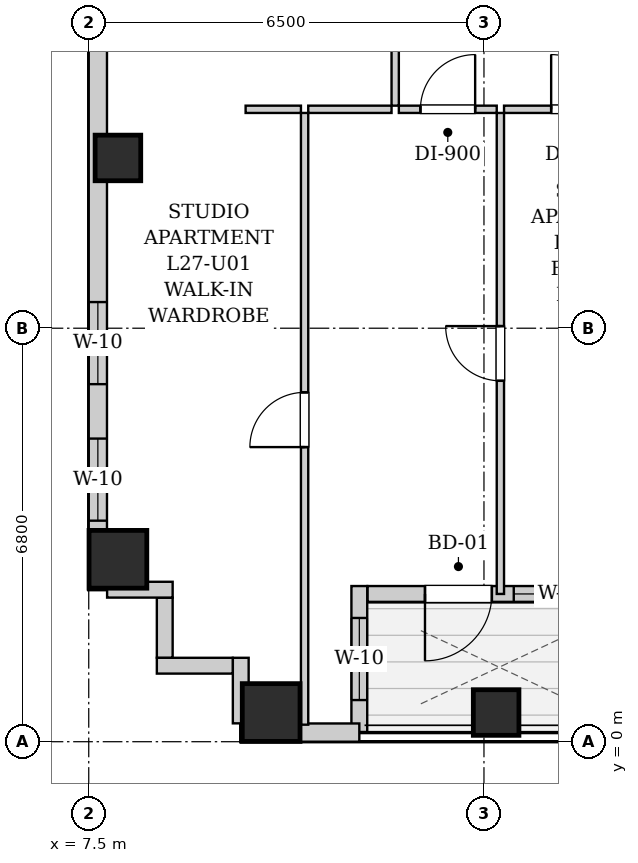
"""IFC4 building model, lengths in metres.
Left out: names, types, materials, properties, quantities, classifications, styles, units other than length and angle.
Written with IfcOpenShell. Run it as: python <this file> out.ifc"""

import sys

from ifc_helpers import new_model, si_unit, direction, frame, frame_2d, origin, origin_2d, place, context, subcontext, project, spatial, rectangle, extrude, element, fill, save


model = new_model("IFC4")
c1 = context("Model", 3, precision=1e-05, world=origin(), true_north=direction((0.0, 1.0)))
c2 = subcontext(c1, "Body", "Model", "MODEL_VIEW")
j1 = project(units=[si_unit("LENGTHUNIT", "METRE"), si_unit("PLANEANGLEUNIT", "RADIAN")], contexts=[c1])
p1 = place(None, origin())
s1 = spatial("IfcSite", under=j1, at=p1, CompositionType="ELEMENT")
p2 = place(p1, origin())
s2 = spatial("IfcBuilding", under=s1, at=p2, CompositionType="ELEMENT")
p3 = place(p2, frame((0.0, 0.0, 97.5)))
s3 = spatial("IfcBuildingStorey", under=s2, at=p3, CompositionType="ELEMENT", Elevation=97.5)
p4 = place(p3, frame((10.5, 0.48, 0.0), z_axis=(0.0, 0.0, 1.0), x_axis=(1.0, 0.0, 0.0)))
e1 = element("IfcColumn", 1, at=p4, inside=s3, PredefinedType="COLUMN", context=c2, shape_type="SweptSolid", body=[
    extrude(rectangle(XDim=0.95, YDim=0.95, at=origin_2d()), origin(), (0.0, 0.0, 1.0), 3.2),
])
p5 = place(p3, frame((14.2, 0.48, 0.0), z_axis=(0.0, 0.0, 1.0), x_axis=(1.0, 0.0, 0.0)))
e2 = element("IfcColumn", 2, at=p5, inside=s3, PredefinedType="COLUMN", context=c2, shape_type="SweptSolid", body=[
    extrude(rectangle(XDim=0.75, YDim=0.75, at=origin_2d()), origin(), (0.0, 0.0, 1.0), 3.2),
])
p6 = place(p3, frame((7.98, 3.0, 0.0), z_axis=(0.0, 0.0, 1.0), x_axis=(1.0, 0.0, 0.0)))
e3 = element("IfcColumn", 3, at=p6, inside=s3, PredefinedType="COLUMN", context=c2, shape_type="SweptSolid", body=[
    extrude(rectangle(XDim=0.95, YDim=0.95, at=origin_2d()), origin(), (0.0, 0.0, 1.0), 3.2),
])
p7 = place(p3, frame((7.98, 9.6, 0.0), z_axis=(0.0, 0.0, 1.0), x_axis=(1.0, 0.0, 0.0)))
e4 = element("IfcColumn", 4, at=p7, inside=s3, PredefinedType="COLUMN", context=c2, shape_type="SweptSolid", body=[
    extrude(rectangle(XDim=0.75, YDim=0.75, at=origin_2d()), origin(), (0.0, 0.0, 1.0), 3.2),
])
p8 = place(p3, frame((16.416, 2.43, 0.0), z_axis=(0.0, 0.0, 1.0), x_axis=(-1.0, 0.0, 0.0)))
e5 = element("IfcWall", 5, at=p8, inside=s3, PredefinedType="SOLIDWALL", context=c2, shape_type="SweptSolid", body=[
    extrude(rectangle(XDim=4.332, YDim=0.26, at=frame_2d((2.166, 0.0))), origin(), (0.0, 0.0, 1.0), 2.94),
])
p9 = place(p8, frame((2.286, 0.0, 0.0)))
e6 = element("IfcOpeningElement", 6, at=p9, cuts=e5, PredefinedType="OPENING", context=c2, shape_type="SweptSolid", body=[
    extrude(rectangle(XDim=1.1, YDim=2.0, at=frame_2d((0.55, 1.0))), frame((0.0, 0.14, 0.0), z_axis=(0.0, -1.0, 0.0), x_axis=(1.0, 0.0, 0.0)), (0.0, 0.0, 1.0), 0.28),
])
p10 = place(p8, frame((0.326, 0.0, 0.85)))
e7 = element("IfcOpeningElement", 7, at=p10, cuts=e5, PredefinedType="OPENING", context=c2, shape_type="SweptSolid", body=[
    extrude(rectangle(XDim=1.6, YDim=1.65, at=frame_2d((0.8, 0.825))), frame((0.0, 0.14, 0.0), z_axis=(0.0, -1.0, 0.0), x_axis=(1.0, 0.0, 0.0)), (0.0, 0.0, 1.0), 0.28),
])
p11 = place(p3, frame((11.95, 2.56, 0.0), z_axis=(0.0, 0.0, 1.0), x_axis=(0.0, -1.0, 0.0)))
e8 = element("IfcWall", 8, at=p11, inside=s3, PredefinedType="SOLIDWALL", context=c2, shape_type="SweptSolid", body=[
    extrude(rectangle(XDim=2.4, YDim=0.26, at=frame_2d((1.2, 0.0))), origin(), (0.0, 0.0, 1.0), 2.94),
])
p12 = place(p11, frame((0.525, 0.0, 0.55)))
e9 = element("IfcOpeningElement", 9, at=p12, cuts=e8, PredefinedType="OPENING", context=c2, shape_type="SweptSolid", body=[
    extrude(rectangle(XDim=1.35, YDim=1.2, at=frame_2d((0.675, 0.6))), frame((0.0, 0.14, 0.0), z_axis=(0.0, -1.0, 0.0), x_axis=(1.0, 0.0, 0.0)), (0.0, 0.0, 1.0), 0.28),
])
p13 = place(p3, frame((11.95, 0.15, 0.0), z_axis=(0.0, 0.0, 1.0), x_axis=(-1.0, 0.0, 0.0)))
e10 = element("IfcWall", 10, at=p13, inside=s3, PredefinedType="SOLIDWALL", context=c2, shape_type="SweptSolid", body=[
    extrude(rectangle(XDim=1.95, YDim=0.3, at=frame_2d((0.975, 0.0))), origin(), (0.0, 0.0, 1.0), 2.94),
])
p14 = place(p3, frame((7.65, 2.5, 0.0), z_axis=(0.0, 0.0, 1.0), x_axis=(0.0, 1.0, 0.0)))
e11 = element("IfcWall", 11, at=p14, inside=s3, PredefinedType="SOLIDWALL", context=c2, shape_type="SweptSolid", body=[
    extrude(rectangle(XDim=38.3, YDim=0.3, at=frame_2d((19.15, 0.0))), origin(), (0.0, 0.0, 1.0), 2.94),
])
p15 = place(p14, frame((3.38, 0.0, 0.55)))
e12 = element("IfcOpeningElement", 12, at=p15, cuts=e11, PredefinedType="OPENING", context=c2, shape_type="SweptSolid", body=[
    extrude(rectangle(XDim=1.35, YDim=1.2, at=frame_2d((0.675, 0.6))), frame((0.0, 0.16, 0.0), z_axis=(0.0, -1.0, 0.0), x_axis=(1.0, 0.0, 0.0)), (0.0, 0.0, 1.0), 0.32),
])
p16 = place(p14, frame((1.135, 0.0, 0.55)))
e13 = element("IfcOpeningElement", 13, at=p16, cuts=e11, PredefinedType="OPENING", context=c2, shape_type="SweptSolid", body=[
    extrude(rectangle(XDim=1.35, YDim=1.2, at=frame_2d((0.675, 0.6))), frame((0.0, 0.16, 0.0), z_axis=(0.0, -1.0, 0.0), x_axis=(1.0, 0.0, 0.0)), (0.0, 0.0, 1.0), 0.32),
])
p17 = place(p14, frame((33.946, 0.0, 0.55)))
e14 = element("IfcOpeningElement", 14, at=p17, cuts=e11, PredefinedType="OPENING", context=c2, shape_type="SweptSolid", body=[
    extrude(rectangle(XDim=1.35, YDim=1.2, at=frame_2d((0.675, 0.6))), frame((0.0, 0.16, 0.0), z_axis=(0.0, -1.0, 0.0), x_axis=(1.0, 0.0, 0.0)), (0.0, 0.0, 1.0), 0.32),
])
p18 = place(p14, frame((32.035, 0.0, 0.55)))
e15 = element("IfcOpeningElement", 15, at=p18, cuts=e11, PredefinedType="OPENING", context=c2, shape_type="SweptSolid", body=[
    extrude(rectangle(XDim=1.35, YDim=1.2, at=frame_2d((0.675, 0.6))), frame((0.0, 0.16, 0.0), z_axis=(0.0, -1.0, 0.0), x_axis=(1.0, 0.0, 0.0)), (0.0, 0.0, 1.0), 0.32),
])
p19 = place(p14, frame((15.65, 0.0, 0.55)))
e16 = element("IfcOpeningElement", 16, at=p19, cuts=e11, PredefinedType="OPENING", context=c2, shape_type="SweptSolid", body=[
    extrude(rectangle(XDim=1.35, YDim=1.2, at=frame_2d((0.675, 0.6))), frame((0.0, 0.16, 0.0), z_axis=(0.0, -1.0, 0.0), x_axis=(1.0, 0.0, 0.0)), (0.0, 0.0, 1.0), 0.32),
])
p20 = place(p14, frame((13.035, 0.0, 0.55)))
e17 = element("IfcOpeningElement", 17, at=p20, cuts=e11, PredefinedType="OPENING", context=c2, shape_type="SweptSolid", body=[
    extrude(rectangle(XDim=1.35, YDim=1.2, at=frame_2d((0.675, 0.6))), frame((0.0, 0.16, 0.0), z_axis=(0.0, -1.0, 0.0), x_axis=(1.0, 0.0, 0.0)), (0.0, 0.0, 1.0), 0.32),
])
p21 = place(p14, frame((22.831, 0.0, 0.55)))
e18 = element("IfcOpeningElement", 18, at=p21, cuts=e11, PredefinedType="OPENING", context=c2, shape_type="SweptSolid", body=[
    extrude(rectangle(XDim=1.35, YDim=1.2, at=frame_2d((0.675, 0.6))), frame((0.0, 0.16, 0.0), z_axis=(0.0, -1.0, 0.0), x_axis=(1.0, 0.0, 0.0)), (0.0, 0.0, 1.0), 0.32),
])
p22 = place(p14, frame((24.441, 0.0, 0.55)))
e19 = element("IfcOpeningElement", 19, at=p22, cuts=e11, PredefinedType="OPENING", context=c2, shape_type="SweptSolid", body=[
    extrude(rectangle(XDim=1.35, YDim=1.2, at=frame_2d((0.675, 0.6))), frame((0.0, 0.16, 0.0), z_axis=(0.0, -1.0, 0.0), x_axis=(1.0, 0.0, 0.0)), (0.0, 0.0, 1.0), 0.32),
])
p23 = place(p3, frame((10.0, 0.302, 0.0), z_axis=(0.0, 0.0, 1.0), x_axis=(0.0, 1.0, 0.0)))
e20 = element("IfcWall", 20, at=p23, inside=s3, PredefinedType="SOLIDWALL", context=c2, shape_type="SweptSolid", body=[
    extrude(rectangle(XDim=1.078, YDim=0.26, at=frame_2d((0.539, 0.0))), origin(), (0.0, 0.0, 1.0), 2.94),
])
p24 = place(p3, frame((9.868, 1.25, 0.0), z_axis=(0.0, 0.0, 1.0), x_axis=(-1.0, 0.0, 0.0)))
e21 = element("IfcWall", 21, at=p24, inside=s3, PredefinedType="SOLIDWALL", context=c2, shape_type="SweptSolid", body=[
    extrude(rectangle(XDim=1.248, YDim=0.26, at=frame_2d((0.624, 0.0))), origin(), (0.0, 0.0, 1.0), 2.94),
])
p25 = place(p3, frame((8.75, 1.382, 0.0), z_axis=(0.0, 0.0, 1.0), x_axis=(0.0, 1.0, 0.0)))
e22 = element("IfcWall", 22, at=p25, inside=s3, PredefinedType="SOLIDWALL", context=c2, shape_type="SweptSolid", body=[
    extrude(rectangle(XDim=0.986, YDim=0.26, at=frame_2d((0.493, 0.0))), origin(), (0.0, 0.0, 1.0), 2.94),
])
p26 = place(p3, frame((8.88, 2.5, 0.0), z_axis=(0.0, 0.0, 1.0), x_axis=(-1.0, 0.0, 0.0)))
e23 = element("IfcWall", 23, at=p26, inside=s3, PredefinedType="SOLIDWALL", context=c2, shape_type="SweptSolid", body=[
    extrude(rectangle(XDim=1.078, YDim=0.26, at=frame_2d((0.539, 0.0))), origin(), (0.0, 0.0, 1.0), 2.94),
])
p27 = place(p3, frame((12.54, 10.46, 0.0), z_axis=(0.0, 0.0, 1.0), x_axis=(0.0, 1.0, 0.0)))
e24 = element("IfcWall", 24, at=p27, inside=s3, PredefinedType="PARTITIONING", context=c2, shape_type="SweptSolid", body=[
    extrude(rectangle(XDim=2.85, YDim=0.12, at=frame_2d((1.425, 0.0))), origin(), (0.0, 0.0, 1.0), 2.94),
])
p28 = place(p27, frame((0.995, 0.0, 0.0)))
e25 = element("IfcOpeningElement", 25, at=p28, cuts=e24, PredefinedType="OPENING", context=c2, shape_type="SweptSolid", body=[
    extrude(rectangle(XDim=0.86, YDim=2.05, at=frame_2d((0.43, 1.025))), frame((0.0, 0.07, 0.0), z_axis=(0.0, -1.0, 0.0), x_axis=(1.0, 0.0, 0.0)), (0.0, 0.0, 1.0), 0.14),
])
p29 = place(p3, frame((10.08, 10.4, 0.0), z_axis=(0.0, 0.0, 1.0), x_axis=(1.0, 0.0, 0.0)))
e26 = element("IfcWall", 26, at=p29, inside=s3, PredefinedType="PARTITIONING", context=c2, shape_type="SweptSolid", body=[
    extrude(rectangle(XDim=0.91, YDim=0.12, at=frame_2d((0.455, 0.0))), origin(), (0.0, 0.0, 1.0), 2.94),
])
p30 = place(p3, frame((11.11, 10.4, 0.0), z_axis=(0.0, 0.0, 1.0), x_axis=(1.0, 0.0, 0.0)))
e27 = element("IfcWall", 27, at=p30, inside=s3, PredefinedType="PARTITIONING", context=c2, shape_type="SweptSolid", body=[
    extrude(rectangle(XDim=1.37, YDim=0.12, at=frame_2d((0.685, 0.0))), origin(), (0.0, 0.0, 1.0), 2.94),
])
p31 = place(p3, frame((12.6, 10.4, 0.0), z_axis=(0.0, 0.0, 1.0), x_axis=(1.0, 0.0, 0.0)))
e28 = element("IfcWall", 28, at=p31, inside=s3, PredefinedType="PARTITIONING", context=c2, shape_type="SweptSolid", body=[
    extrude(rectangle(XDim=1.61, YDim=0.12, at=frame_2d((0.805, 0.0))), origin(), (0.0, 0.0, 1.0), 2.94),
])
p32 = place(p31, frame((0.355, 0.0, 0.0)))
e29 = element("IfcOpeningElement", 29, at=p32, cuts=e28, PredefinedType="OPENING", context=c2, shape_type="SweptSolid", body=[
    extrude(rectangle(XDim=0.9, YDim=2.05, at=frame_2d((0.45, 1.025))), frame((0.0, 0.07, 0.0), z_axis=(0.0, -1.0, 0.0), x_axis=(1.0, 0.0, 0.0)), (0.0, 0.0, 1.0), 0.14),
])
p33 = place(p3, frame((14.33, 10.4, 0.0), z_axis=(0.0, 0.0, 1.0), x_axis=(1.0, 0.0, 0.0)))
e30 = element("IfcWall", 30, at=p33, inside=s3, PredefinedType="PARTITIONING", context=c2, shape_type="SweptSolid", body=[
    extrude(rectangle(XDim=2.45, YDim=0.12, at=frame_2d((1.225, 0.0))), origin(), (0.0, 0.0, 1.0), 2.94),
])
p34 = place(p33, frame((0.775, 0.0, 0.0)))
e31 = element("IfcOpeningElement", 31, at=p34, cuts=e30, PredefinedType="OPENING", context=c2, shape_type="SweptSolid", body=[
    extrude(rectangle(XDim=0.9, YDim=2.05, at=frame_2d((0.45, 1.025))), frame((0.0, 0.07, 0.0), z_axis=(0.0, -1.0, 0.0), x_axis=(1.0, 0.0, 0.0)), (0.0, 0.0, 1.0), 0.14),
])
p35 = place(p3, frame((11.05, 0.28, 0.0), z_axis=(0.0, 0.0, 1.0), x_axis=(0.0, 1.0, 0.0)))
e32 = element("IfcWall", 32, at=p35, inside=s3, PredefinedType="PARTITIONING", context=c2, shape_type="SweptSolid", body=[
    extrude(rectangle(XDim=10.06, YDim=0.12, at=frame_2d((5.03, 0.0))), origin(), (0.0, 0.0, 1.0), 2.94),
])
p36 = place(p35, frame((4.565, 0.0, 0.0)))
e33 = element("IfcOpeningElement", 33, at=p36, cuts=e32, PredefinedType="OPENING", context=c2, shape_type="SweptSolid", body=[
    extrude(rectangle(XDim=0.9, YDim=2.05, at=frame_2d((0.45, 1.025))), frame((0.0, 0.07, 0.0), z_axis=(0.0, -1.0, 0.0), x_axis=(1.0, 0.0, 0.0)), (0.0, 0.0, 1.0), 0.14),
])
p37 = place(p3, frame((14.27, 2.43, 0.0), z_axis=(0.0, 0.0, 1.0), x_axis=(0.0, 1.0, 0.0)))
e34 = element("IfcWall", 34, at=p37, inside=s3, PredefinedType="PARTITIONING", context=c2, shape_type="SweptSolid", body=[
    extrude(rectangle(XDim=7.91, YDim=0.12, at=frame_2d((3.955, 0.0))), origin(), (0.0, 0.0, 1.0), 2.94),
])
p38 = place(p37, frame((3.505, 0.0, 0.0)))
e35 = element("IfcOpeningElement", 35, at=p38, cuts=e34, PredefinedType="OPENING", context=c2, shape_type="SweptSolid", body=[
    extrude(rectangle(XDim=0.9, YDim=2.05, at=frame_2d((0.45, 1.025))), frame((0.0, 0.07, 0.0), z_axis=(0.0, -1.0, 0.0), x_axis=(1.0, 0.0, 0.0)), (0.0, 0.0, 1.0), 0.14),
])
p39 = place(p32, origin())
e36 = element("IfcDoor", 36, at=p39, inside=s3, OperationType="SINGLE_SWING_RIGHT", PredefinedType="DOOR", context=c2, shape_type="SweptSolid", body=[
    extrude(rectangle(XDim=0.9, YDim=2.05, at=frame_2d((0.45, 1.025))), frame((0.0, 0.025, 0.0), z_axis=(0.0, -1.0, 0.0), x_axis=(1.0, 0.0, 0.0)), (0.0, 0.0, 1.0), 0.05),
])
fill(e29, e36)
p40 = place(p34, origin())
e37 = element("IfcDoor", 37, at=p40, inside=s3, OperationType="SINGLE_SWING_LEFT", PredefinedType="DOOR", context=c2, shape_type="SweptSolid", body=[
    extrude(rectangle(XDim=0.9, YDim=2.05, at=frame_2d((0.45, 1.025))), frame((0.0, 0.025, 0.0), z_axis=(0.0, -1.0, 0.0), x_axis=(1.0, 0.0, 0.0)), (0.0, 0.0, 1.0), 0.05),
])
fill(e31, e37)
p41 = place(p36, origin())
e38 = element("IfcDoor", 38, at=p41, inside=s3, OperationType="SINGLE_SWING_LEFT", PredefinedType="DOOR", context=c2, shape_type="SweptSolid", body=[
    extrude(rectangle(XDim=0.9, YDim=2.05, at=frame_2d((0.45, 1.025))), frame((0.0, 0.025, 0.0), z_axis=(0.0, -1.0, 0.0), x_axis=(1.0, 0.0, 0.0)), (0.0, 0.0, 1.0), 0.05),
])
fill(e33, e38)
p42 = place(p38, origin())
e39 = element("IfcDoor", 39, at=p42, inside=s3, OperationType="SINGLE_SWING_RIGHT", PredefinedType="DOOR", context=c2, shape_type="SweptSolid", body=[
    extrude(rectangle(XDim=0.9, YDim=2.05, at=frame_2d((0.45, 1.025))), frame((0.0, 0.025, 0.0), z_axis=(0.0, -1.0, 0.0), x_axis=(1.0, 0.0, 0.0)), (0.0, 0.0, 1.0), 0.05),
])
fill(e35, e39)
p43 = place(p9, origin())
e40 = element("IfcDoor", 40, at=p43, inside=s3, OperationType="SINGLE_SWING_RIGHT", PredefinedType="DOOR", context=c2, shape_type="SweptSolid", body=[
    extrude(rectangle(XDim=1.1, YDim=2.0, at=frame_2d((0.55, 1.0))), frame((0.0, 0.025, 0.0), z_axis=(0.0, -1.0, 0.0), x_axis=(1.0, 0.0, 0.0)), (0.0, 0.0, 1.0), 0.05),
])
fill(e6, e40)
p44 = place(p15, origin())
e41 = element("IfcWindow", 41, at=p44, inside=s3, PartitioningType="SINGLE_PANEL", PredefinedType="WINDOW", context=c2, shape_type="SweptSolid", body=[
    extrude(rectangle(XDim=1.35, YDim=1.2, at=frame_2d((0.675, 0.6))), frame((0.0, 0.03, 0.0), z_axis=(0.0, -1.0, 0.0), x_axis=(1.0, 0.0, 0.0)), (0.0, 0.0, 1.0), 0.06),
])
fill(e12, e41)
p45 = place(p16, origin())
e42 = element("IfcWindow", 42, at=p45, inside=s3, PartitioningType="SINGLE_PANEL", PredefinedType="WINDOW", context=c2, shape_type="SweptSolid", body=[
    extrude(rectangle(XDim=1.35, YDim=1.2, at=frame_2d((0.675, 0.6))), frame((0.0, 0.03, 0.0), z_axis=(0.0, -1.0, 0.0), x_axis=(1.0, 0.0, 0.0)), (0.0, 0.0, 1.0), 0.06),
])
fill(e13, e42)
p46 = place(p12, origin())
e43 = element("IfcWindow", 43, at=p46, inside=s3, PartitioningType="SINGLE_PANEL", PredefinedType="WINDOW", context=c2, shape_type="SweptSolid", body=[
    extrude(rectangle(XDim=1.35, YDim=1.2, at=frame_2d((0.675, 0.6))), frame((0.0, 0.03, 0.0), z_axis=(0.0, -1.0, 0.0), x_axis=(1.0, 0.0, 0.0)), (0.0, 0.0, 1.0), 0.06),
])
fill(e9, e43)
p47 = place(p10, origin())
e44 = element("IfcWindow", 44, at=p47, inside=s3, PartitioningType="DOUBLE_PANEL_VERTICAL", PredefinedType="WINDOW", context=c2, shape_type="SweptSolid", body=[
    extrude(rectangle(XDim=1.6, YDim=1.65, at=frame_2d((0.8, 0.825))), frame((0.0, 0.03, 0.0), z_axis=(0.0, -1.0, 0.0), x_axis=(1.0, 0.0, 0.0)), (0.0, 0.0, 1.0), 0.06),
])
fill(e7, e44)
save(model, sys.argv[1])
